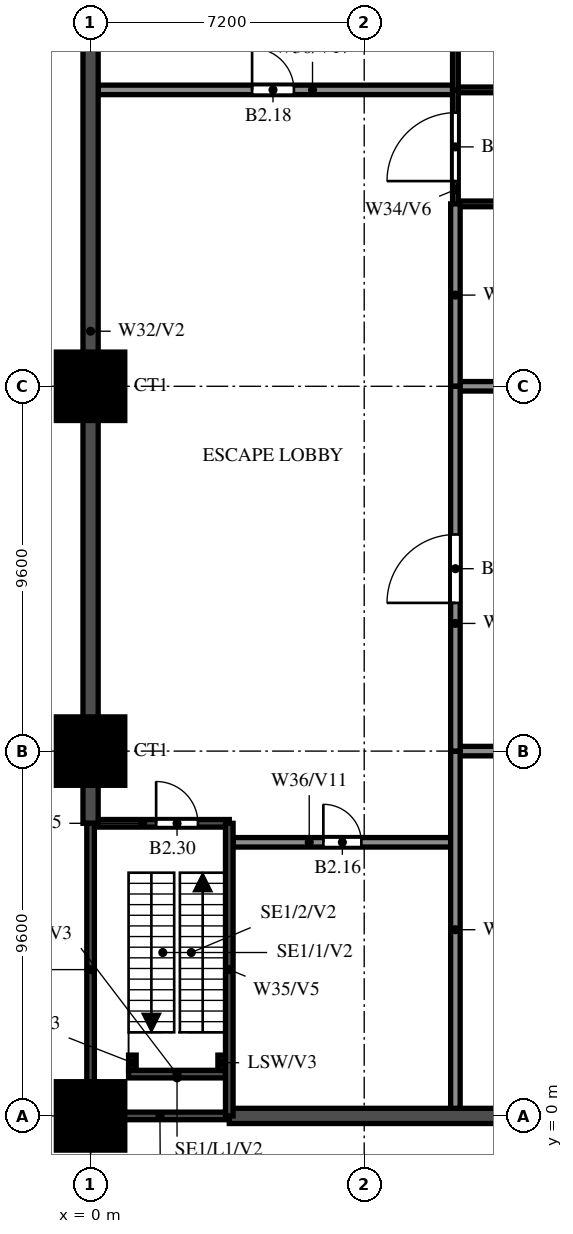
"""IFC4 building model, lengths in metres.
Left out: names, types, materials, properties, quantities, classifications, styles, units other than length and angle.
Written with IfcOpenShell. Run it as: python <this file> out.ifc"""

import sys

from ifc_helpers import new_model, si_unit, direction, frame, frame_2d, origin, origin_with_axes, origin_2d, place, context, subcontext, project, spatial, rectangle, extrude, source, transform, mapped, element, fill, save


model = new_model("IFC4")
c1 = context("Model", 3, precision=1e-05, world=origin(), true_north=direction((0.0, 1.0)))
c2 = subcontext(c1, "Body", "Model", "MODEL_VIEW")
j1 = project(units=[si_unit("LENGTHUNIT", "METRE"), si_unit("PLANEANGLEUNIT", "RADIAN")], contexts=[c1])
p1 = place(None, origin())
s1 = spatial("IfcSite", under=j1, at=p1, CompositionType="ELEMENT")
p2 = place(p1, origin())
s2 = spatial("IfcBuilding", under=s1, at=p2, CompositionType="ELEMENT")
p3 = place(p2, frame((0.0, 0.0, -11.4)))
s3 = spatial("IfcBuildingStorey", under=s2, at=p3, CompositionType="ELEMENT", Elevation=-11.4)
m1 = source(origin(), c2, "Body", "SweptSolid", [
    extrude(rectangle(XDim=1.8, YDim=1.8, at=origin_2d()), origin(), (0.0, 0.0, 1.0), 5.6),
])
for number, where, z_axis, x_axis in (
    (1, (0.0, 0.0, 0.0), (0.0, 0.0, 1.0), (1.0, 0.0, 0.0)),
    (2, (0.0, 9.6, 0.0), (0.0, 0.0, 1.0), (1.0, 0.0, 0.0)),
    (3, (0.0, 19.2, 0.0), (0.0, 0.0, 1.0), (1.0, 0.0, 0.0)),
):
    element("IfcColumn", number, at=place(p3, frame(where, z_axis=z_axis, x_axis=x_axis)), inside=s3, PredefinedType="COLUMN", context=c2, shape_type="MappedRepresentation", body=[
        mapped(m1, transform((0.0, 0.0, 0.0))),
    ])
for number, where, z_axis, x_axis in (
    (4, (1.1, 1.2, 0.0), (0.0, 0.0, 1.0), (0.0, 1.0, 0.0)),
    (5, (3.45, 1.2, 0.0), (0.0, 0.0, 1.0), (0.0, 1.0, 0.0)),
):
    element("IfcWall", number, at=place(p3, frame(where, z_axis=z_axis, x_axis=x_axis)), inside=s3, PredefinedType="SOLIDWALL", context=c2, shape_type="SweptSolid", body=[
        extrude(rectangle(XDim=0.4, YDim=0.2, at=frame_2d((0.2, 0.0))), origin(), (0.0, 0.0, 1.0), 2.8),
    ])
p4 = place(p3, frame((1.0, 1.1, 0.0), z_axis=(0.0, 0.0, 1.0), x_axis=(1.0, 0.0, 0.0)))
e6 = element("IfcWall", 6, at=p4, inside=s3, PredefinedType="SOLIDWALL", context=c2, shape_type="SweptSolid", body=[
    extrude(rectangle(XDim=2.55, YDim=0.2, at=frame_2d((1.275, 0.0))), origin(), (0.0, 0.0, 1.0), 2.8),
])
p5 = place(p3, frame((3.65, 0.0, 0.0), z_axis=(0.0, 0.0, 1.0), x_axis=(1.0, 0.0, 0.0)))
e7 = element("IfcWall", 7, at=p5, inside=s3, PredefinedType="SOLIDWALL", context=c2, shape_type="SweptSolid", body=[
    extrude(rectangle(XDim=93.5, YDim=0.4, at=frame_2d((46.75, 0.0))), origin(), (0.0, 0.0, 1.0), 5.6),
])
p6 = place(p3, origin_with_axes())
e8 = element("IfcWall", 8, at=p6, inside=s3, PredefinedType="SOLIDWALL", context=c2, shape_type="SweptSolid", body=[
    extrude(rectangle(XDim=3.65, YDim=0.2, at=frame_2d((1.825, 0.0))), origin(), (0.0, 0.0, 1.0), 5.6),
])
p7 = place(p3, frame((3.75, 7.2, 0.0), z_axis=(0.0, 0.0, 1.0), x_axis=(1.0, 0.0, 0.0)))
e9 = element("IfcWall", 9, at=p7, inside=s3, PredefinedType="SOLIDWALL", context=c2, shape_type="SweptSolid", body=[
    extrude(rectangle(XDim=5.725, YDim=0.25, at=frame_2d((2.863, 0.0))), origin(), (0.0, 0.0, 1.0), 5.6),
])
p8 = place(p7, frame((2.375, 0.0, 0.0)))
e10 = element("IfcOpeningElement", 10, at=p8, cuts=e9, PredefinedType="OPENING", context=c2, shape_type="SweptSolid", body=[
    extrude(rectangle(XDim=1.0, YDim=2.1, at=frame_2d((0.5, 1.05))), frame((0.0, 0.135, 0.0), z_axis=(0.0, -1.0, 0.0), x_axis=(1.0, 0.0, 0.0)), (0.0, 0.0, 1.0), 0.27),
])
p9 = place(p3, frame((0.0, 7.7, 0.0), z_axis=(0.0, 0.0, 1.0), x_axis=(1.0, 0.0, 0.0)))
e11 = element("IfcWall", 11, at=p9, inside=s3, PredefinedType="SOLIDWALL", context=c2, shape_type="SweptSolid", body=[
    extrude(rectangle(XDim=3.65, YDim=0.2, at=frame_2d((1.825, 0.0))), origin(), (0.0, 0.0, 1.0), 5.6),
])
p10 = place(p9, frame((1.725, 0.0, 0.0)))
e12 = element("IfcOpeningElement", 12, at=p10, cuts=e11, PredefinedType="OPENING", context=c2, shape_type="SweptSolid", body=[
    extrude(rectangle(XDim=1.1, YDim=2.1, at=frame_2d((0.55, 1.05))), frame((0.0, 0.11, 0.0), z_axis=(0.0, -1.0, 0.0), x_axis=(1.0, 0.0, 0.0)), (0.0, 0.0, 1.0), 0.22),
])
p11 = place(p3, frame((9.6, 9.6, 0.0), z_axis=(0.0, 0.0, 1.0), x_axis=(1.0, 0.0, 0.0)))
e13 = element("IfcWall", 13, at=p11, inside=s3, PredefinedType="SOLIDWALL", context=c2, shape_type="SweptSolid", body=[
    extrude(rectangle(XDim=81.6, YDim=0.25, at=frame_2d((40.8, 0.0))), origin(), (0.0, 0.0, 1.0), 2.2),
])
p12 = place(p11, frame((11.1, 0.0, 0.0)))
e14 = element("IfcOpeningElement", 14, at=p12, cuts=e13, PredefinedType="OPENING", context=c2, shape_type="SweptSolid", body=[
    extrude(rectangle(XDim=1.8, YDim=2.1, at=frame_2d((0.9, 1.05))), frame((0.0, 0.135, 0.0), z_axis=(0.0, -1.0, 0.0), x_axis=(1.0, 0.0, 0.0)), (0.0, 0.0, 1.0), 0.27),
])
p13 = place(p11, frame((25.5, 0.0, 0.0)))
e15 = element("IfcOpeningElement", 15, at=p13, cuts=e13, PredefinedType="OPENING", context=c2, shape_type="SweptSolid", body=[
    extrude(rectangle(XDim=1.8, YDim=2.1, at=frame_2d((0.9, 1.05))), frame((0.0, 0.135, 0.0), z_axis=(0.0, -1.0, 0.0), x_axis=(1.0, 0.0, 0.0)), (0.0, 0.0, 1.0), 0.27),
])
p14 = place(p11, frame((39.9, 0.0, 0.0)))
e16 = element("IfcOpeningElement", 16, at=p14, cuts=e13, PredefinedType="OPENING", context=c2, shape_type="SweptSolid", body=[
    extrude(rectangle(XDim=1.8, YDim=2.1, at=frame_2d((0.9, 1.05))), frame((0.0, 0.135, 0.0), z_axis=(0.0, -1.0, 0.0), x_axis=(1.0, 0.0, 0.0)), (0.0, 0.0, 1.0), 0.27),
])
p15 = place(p11, frame((54.3, 0.0, 0.0)))
e17 = element("IfcOpeningElement", 17, at=p15, cuts=e13, PredefinedType="OPENING", context=c2, shape_type="SweptSolid", body=[
    extrude(rectangle(XDim=1.8, YDim=2.1, at=frame_2d((0.9, 1.05))), frame((0.0, 0.135, 0.0), z_axis=(0.0, -1.0, 0.0), x_axis=(1.0, 0.0, 0.0)), (0.0, 0.0, 1.0), 0.27),
])
p16 = place(p11, frame((68.7, 0.0, 0.0)))
e18 = element("IfcOpeningElement", 18, at=p16, cuts=e13, PredefinedType="OPENING", context=c2, shape_type="SweptSolid", body=[
    extrude(rectangle(XDim=1.8, YDim=2.1, at=frame_2d((0.9, 1.05))), frame((0.0, 0.135, 0.0), z_axis=(0.0, -1.0, 0.0), x_axis=(1.0, 0.0, 0.0)), (0.0, 0.0, 1.0), 0.27),
])
p17 = place(p3, frame((9.6, 19.2, 0.0), z_axis=(0.0, 0.0, 1.0), x_axis=(1.0, 0.0, 0.0)))
e19 = element("IfcWall", 19, at=p17, inside=s3, PredefinedType="SOLIDWALL", context=c2, shape_type="SweptSolid", body=[
    extrude(rectangle(XDim=49.2, YDim=0.25, at=frame_2d((24.6, 0.0))), origin(), (0.0, 0.0, 1.0), 2.2),
])
p18 = place(p17, frame((11.1, 0.0, 0.0)))
e20 = element("IfcOpeningElement", 20, at=p18, cuts=e19, PredefinedType="OPENING", context=c2, shape_type="SweptSolid", body=[
    extrude(rectangle(XDim=1.8, YDim=2.1, at=frame_2d((0.9, 1.05))), frame((0.0, 0.135, 0.0), z_axis=(0.0, -1.0, 0.0), x_axis=(1.0, 0.0, 0.0)), (0.0, 0.0, 1.0), 0.27),
])
p19 = place(p17, frame((25.5, 0.0, 0.0)))
e21 = element("IfcOpeningElement", 21, at=p19, cuts=e19, PredefinedType="OPENING", context=c2, shape_type="SweptSolid", body=[
    extrude(rectangle(XDim=1.8, YDim=2.1, at=frame_2d((0.9, 1.05))), frame((0.0, 0.135, 0.0), z_axis=(0.0, -1.0, 0.0), x_axis=(1.0, 0.0, 0.0)), (0.0, 0.0, 1.0), 0.27),
])
p20 = place(p17, frame((39.9, 0.0, 0.0)))
e22 = element("IfcOpeningElement", 22, at=p20, cuts=e19, PredefinedType="OPENING", context=c2, shape_type="SweptSolid", body=[
    extrude(rectangle(XDim=1.8, YDim=2.1, at=frame_2d((0.9, 1.05))), frame((0.0, 0.135, 0.0), z_axis=(0.0, -1.0, 0.0), x_axis=(1.0, 0.0, 0.0)), (0.0, 0.0, 1.0), 0.27),
])
p21 = place(p3, frame((9.6, 24.0, 0.0), z_axis=(0.0, 0.0, 1.0), x_axis=(1.0, 0.0, 0.0)))
e23 = element("IfcWall", 23, at=p21, inside=s3, PredefinedType="PARTITIONING", context=c2, shape_type="SweptSolid", body=[
    extrude(rectangle(XDim=81.6, YDim=0.15, at=frame_2d((40.8, 0.0))), origin(), (0.0, 0.0, 1.0), 4.4),
])
p22 = place(p3, frame((9.6, 27.0, 0.0), z_axis=(0.0, 0.0, 1.0), x_axis=(1.0, 0.0, 0.0)))
e24 = element("IfcWall", 24, at=p22, inside=s3, PredefinedType="PARTITIONING", context=c2, shape_type="SweptSolid", body=[
    extrude(rectangle(XDim=54.0, YDim=0.15, at=frame_2d((27.0, 0.0))), origin(), (0.0, 0.0, 1.0), 4.4),
])
p23 = place(p22, frame((3.6, 0.0, 0.0)))
e25 = element("IfcOpeningElement", 25, at=p23, cuts=e24, PredefinedType="OPENING", context=c2, shape_type="SweptSolid", body=[
    extrude(rectangle(XDim=1.8, YDim=2.4, at=frame_2d((0.9, 1.2))), frame((0.0, 0.085, 0.0), z_axis=(0.0, -1.0, 0.0), x_axis=(1.0, 0.0, 0.0)), (0.0, 0.0, 1.0), 0.17),
])
p24 = place(p22, frame((12.9, 0.0, 0.0)))
e26 = element("IfcOpeningElement", 26, at=p24, cuts=e24, PredefinedType="OPENING", context=c2, shape_type="SweptSolid", body=[
    extrude(rectangle(XDim=1.2, YDim=2.1, at=frame_2d((0.6, 1.05))), frame((0.0, 0.085, 0.0), z_axis=(0.0, -1.0, 0.0), x_axis=(1.0, 0.0, 0.0)), (0.0, 0.0, 1.0), 0.17),
])
p25 = place(p22, frame((21.9, 0.0, 0.0)))
e27 = element("IfcOpeningElement", 27, at=p25, cuts=e24, PredefinedType="OPENING", context=c2, shape_type="SweptSolid", body=[
    extrude(rectangle(XDim=1.2, YDim=2.1, at=frame_2d((0.6, 1.05))), frame((0.0, 0.085, 0.0), z_axis=(0.0, -1.0, 0.0), x_axis=(1.0, 0.0, 0.0)), (0.0, 0.0, 1.0), 0.17),
])
p26 = place(p22, frame((30.9, 0.0, 0.0)))
e28 = element("IfcOpeningElement", 28, at=p26, cuts=e24, PredefinedType="OPENING", context=c2, shape_type="SweptSolid", body=[
    extrude(rectangle(XDim=1.2, YDim=2.1, at=frame_2d((0.6, 1.05))), frame((0.0, 0.085, 0.0), z_axis=(0.0, -1.0, 0.0), x_axis=(1.0, 0.0, 0.0)), (0.0, 0.0, 1.0), 0.17),
])
p27 = place(p22, frame((39.6, 0.0, 0.0)))
e29 = element("IfcOpeningElement", 29, at=p27, cuts=e24, PredefinedType="OPENING", context=c2, shape_type="SweptSolid", body=[
    extrude(rectangle(XDim=1.8, YDim=2.4, at=frame_2d((0.9, 1.2))), frame((0.0, 0.085, 0.0), z_axis=(0.0, -1.0, 0.0), x_axis=(1.0, 0.0, 0.0)), (0.0, 0.0, 1.0), 0.17),
])
p28 = place(p22, frame((48.9, 0.0, 0.0)))
e30 = element("IfcOpeningElement", 30, at=p28, cuts=e24, PredefinedType="OPENING", context=c2, shape_type="SweptSolid", body=[
    extrude(rectangle(XDim=1.2, YDim=2.1, at=frame_2d((0.6, 1.05))), frame((0.0, 0.085, 0.0), z_axis=(0.0, -1.0, 0.0), x_axis=(1.0, 0.0, 0.0)), (0.0, 0.0, 1.0), 0.17),
])
p29 = place(p3, frame((0.2, 27.0, 0.0), z_axis=(0.0, 0.0, 1.0), x_axis=(1.0, 0.0, 0.0)))
e31 = element("IfcWall", 31, at=p29, inside=s3, PredefinedType="SOLIDWALL", context=c2, shape_type="SweptSolid", body=[
    extrude(rectangle(XDim=9.4, YDim=0.25, at=frame_2d((4.7, 0.0))), origin(), (0.0, 0.0, 1.0), 4.4),
])
p30 = place(p29, frame((4.05, 0.0, 0.0)))
e32 = element("IfcOpeningElement", 32, at=p30, cuts=e31, PredefinedType="OPENING", context=c2, shape_type="SweptSolid", body=[
    extrude(rectangle(XDim=1.1, YDim=2.1, at=frame_2d((0.55, 1.05))), frame((0.0, 0.135, 0.0), z_axis=(0.0, -1.0, 0.0), x_axis=(1.0, 0.0, 0.0)), (0.0, 0.0, 1.0), 0.27),
])
p31 = place(p3, frame((0.0, 7.7, 0.0), z_axis=(0.0, 0.0, 1.0), x_axis=(0.0, 1.0, 0.0)))
e33 = element("IfcWall", 33, at=p31, inside=s3, PredefinedType="SOLIDWALL", context=c2, shape_type="SweptSolid", body=[
    extrude(rectangle(XDim=25.9, YDim=0.4, at=frame_2d((12.95, 0.0))), origin(), (0.0, 0.0, 1.0), 5.6),
])
for number, where, z_axis, x_axis in (
    (34, (0.0, 0.0, 0.0), (0.0, 0.0, 1.0), (0.0, 1.0, 0.0)),
    (35, (3.65, 0.0, 0.0), (0.0, 0.0, 1.0), (0.0, 1.0, 0.0)),
):
    element("IfcWall", number, at=place(p3, frame(where, z_axis=z_axis, x_axis=x_axis)), inside=s3, PredefinedType="SOLIDWALL", context=c2, shape_type="SweptSolid", body=[
        extrude(rectangle(XDim=7.7, YDim=0.2, at=frame_2d((3.85, 0.0))), origin(), (0.0, 0.0, 1.0), 5.6),
    ])
p32 = place(p3, frame((9.6, 24.0, 0.0), z_axis=(0.0, 0.0, 1.0), x_axis=(0.0, 1.0, 0.0)))
e36 = element("IfcWall", 36, at=p32, inside=s3, PredefinedType="PARTITIONING", context=c2, shape_type="SweptSolid", body=[
    extrude(rectangle(XDim=3.0, YDim=0.15, at=frame_2d((1.5, 0.0))), origin(), (0.0, 0.0, 1.0), 5.6),
])
p33 = place(p32, frame((0.6, 0.0, 0.0)))
e37 = element("IfcOpeningElement", 37, at=p33, cuts=e36, PredefinedType="OPENING", context=c2, shape_type="SweptSolid", body=[
    extrude(rectangle(XDim=1.8, YDim=2.1, at=frame_2d((0.9, 1.05))), frame((0.0, 0.085, 0.0), z_axis=(0.0, -1.0, 0.0), x_axis=(1.0, 0.0, 0.0)), (0.0, 0.0, 1.0), 0.17),
])
p34 = place(p3, frame((9.6, 27.0, 0.0), z_axis=(0.0, 0.0, 1.0), x_axis=(0.0, 1.0, 0.0)))
e38 = element("IfcWall", 38, at=p34, inside=s3, PredefinedType="PARTITIONING", context=c2, shape_type="SweptSolid", body=[
    extrude(rectangle(XDim=6.4, YDim=0.15, at=frame_2d((3.2, 0.0))), origin(), (0.0, 0.0, 1.0), 5.6),
])
p35 = place(p3, frame((9.6, 0.2, 0.0), z_axis=(0.0, 0.0, 1.0), x_axis=(0.0, 1.0, 0.0)))
e39 = element("IfcWall", 39, at=p35, inside=s3, PredefinedType="SOLIDWALL", context=c2, shape_type="SweptSolid", body=[
    extrude(rectangle(XDim=9.4, YDim=0.25, at=frame_2d((4.7, 0.0))), origin(), (0.0, 0.0, 1.0), 2.2),
])
p36 = place(p3, frame((9.6, 19.2, 0.0), z_axis=(0.0, 0.0, 1.0), x_axis=(0.0, 1.0, 0.0)))
e40 = element("IfcWall", 40, at=p36, inside=s3, PredefinedType="SOLIDWALL", context=c2, shape_type="SweptSolid", body=[
    extrude(rectangle(XDim=4.8, YDim=0.25, at=frame_2d((2.4, 0.0))), origin(), (0.0, 0.0, 1.0), 2.2),
])
p37 = place(p3, frame((9.6, 9.6, 0.0), z_axis=(0.0, 0.0, 1.0), x_axis=(0.0, 1.0, 0.0)))
e41 = element("IfcWall", 41, at=p37, inside=s3, PredefinedType="SOLIDWALL", context=c2, shape_type="SweptSolid", body=[
    extrude(rectangle(XDim=9.6, YDim=0.25, at=frame_2d((4.8, 0.0))), origin(), (0.0, 0.0, 1.0), 2.2),
])
p38 = place(p37, frame((3.9, 0.0, 0.0)))
e42 = element("IfcOpeningElement", 42, at=p38, cuts=e41, PredefinedType="OPENING", context=c2, shape_type="SweptSolid", body=[
    extrude(rectangle(XDim=1.8, YDim=2.1, at=frame_2d((0.9, 1.05))), frame((0.0, 0.135, 0.0), z_axis=(0.0, -1.0, 0.0), x_axis=(1.0, 0.0, 0.0)), (0.0, 0.0, 1.0), 0.27),
])
p39 = place(p33, origin())
e43 = element("IfcDoor", 43, at=p39, inside=s3, OperationType="DOUBLE_DOOR_SINGLE_SWING", PredefinedType="DOOR", context=c2, shape_type="SweptSolid", body=[
    extrude(rectangle(XDim=1.8, YDim=2.1, at=frame_2d((0.9, 1.05))), frame((0.0, 0.025, 0.0), z_axis=(0.0, -1.0, 0.0), x_axis=(1.0, 0.0, 0.0)), (0.0, 0.0, 1.0), 0.05),
])
fill(e37, e43)
p40 = place(p38, origin())
e44 = element("IfcDoor", 44, at=p40, inside=s3, OperationType="DOUBLE_DOOR_SINGLE_SWING", PredefinedType="DOOR", context=c2, shape_type="SweptSolid", body=[
    extrude(rectangle(XDim=1.8, YDim=2.1, at=frame_2d((0.9, 1.05))), frame((0.0, 0.025, 0.0), z_axis=(0.0, -1.0, 0.0), x_axis=(1.0, 0.0, 0.0)), (0.0, 0.0, 1.0), 0.05),
])
fill(e42, e44)
p41 = place(p8, origin())
e45 = element("IfcDoor", 45, at=p41, inside=s3, OperationType="SINGLE_SWING_RIGHT", PredefinedType="DOOR", context=c2, shape_type="SweptSolid", body=[
    extrude(rectangle(XDim=1.0, YDim=2.1, at=frame_2d((0.5, 1.05))), frame((0.0, 0.025, 0.0), z_axis=(0.0, -1.0, 0.0), x_axis=(1.0, 0.0, 0.0)), (0.0, 0.0, 1.0), 0.05),
])
fill(e10, e45)
p42 = place(p30, origin())
e46 = element("IfcDoor", 46, at=p42, inside=s3, OperationType="SINGLE_SWING_LEFT", PredefinedType="DOOR", context=c2, shape_type="SweptSolid", body=[
    extrude(rectangle(XDim=1.1, YDim=2.1, at=frame_2d((0.55, 1.05))), frame((0.0, 0.025, 0.0), z_axis=(0.0, -1.0, 0.0), x_axis=(1.0, 0.0, 0.0)), (0.0, 0.0, 1.0), 0.05),
])
fill(e32, e46)
p43 = place(p10, origin())
e47 = element("IfcDoor", 47, at=p43, inside=s3, OperationType="SINGLE_SWING_RIGHT", PredefinedType="DOOR", context=c2, shape_type="SweptSolid", body=[
    extrude(rectangle(XDim=1.1, YDim=2.1, at=frame_2d((0.55, 1.05))), frame((0.0, 0.025, 0.0), z_axis=(0.0, -1.0, 0.0), x_axis=(1.0, 0.0, 0.0)), (0.0, 0.0, 1.0), 0.05),
])
fill(e12, e47)
save(model, sys.argv[1])
